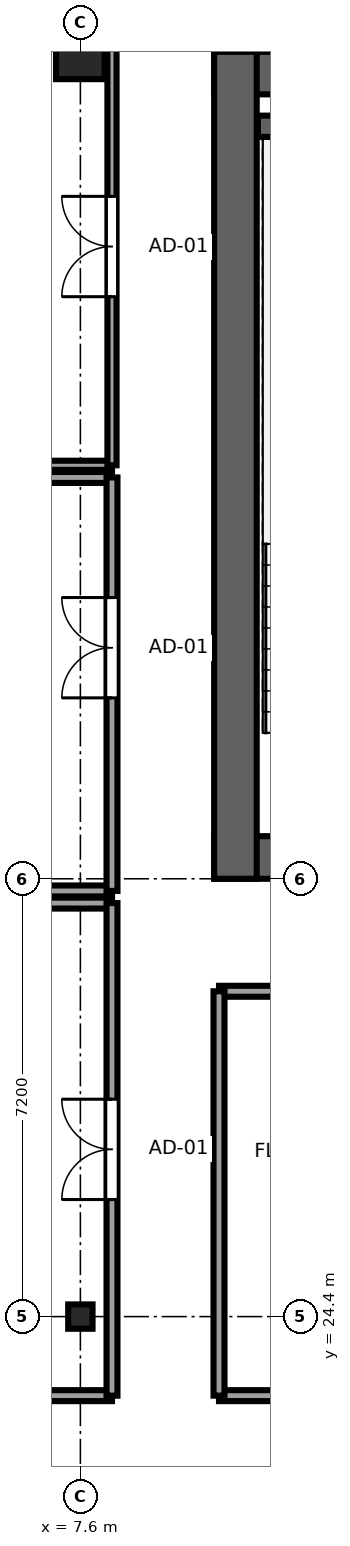
"""IFC4 building model, lengths in metres.
Left out: names, types, materials, properties, quantities, classifications, styles, units other than length and angle.
Written with IfcOpenShell. Run it as: python <this file> out.ifc"""

import sys

from ifc_helpers import new_model, si_unit, direction, frame, frame_2d, origin, origin_2d, place, context, subcontext, project, spatial, rectangle, i_section, extrude, source, transform, mapped, element, fill, save


model = new_model("IFC4")
c1 = context("Model", 3, precision=1e-05, world=origin(), true_north=direction((0.0, 1.0)))
c2 = subcontext(c1, "Body", "Model", "MODEL_VIEW")
j1 = project(units=[si_unit("LENGTHUNIT", "METRE"), si_unit("PLANEANGLEUNIT", "RADIAN")], contexts=[c1])
p1 = place(None, origin())
s1 = spatial("IfcSite", under=j1, at=p1, CompositionType="ELEMENT")
p2 = place(p1, origin())
s2 = spatial("IfcBuilding", under=s1, at=p2, CompositionType="ELEMENT")
p3 = place(p2, frame((0.0, 0.0, 168.35)))
s3 = spatial("IfcBuildingStorey", under=s2, at=p3, CompositionType="ELEMENT", Elevation=168.35)
p4 = place(p3, frame((9.8, 31.95, 0.0), z_axis=(0.0, 0.0, 1.0), x_axis=(1.0, 0.0, 0.0)))
e1 = element("IfcWall", 1, at=p4, inside=s3, PredefinedType="SHEAR", context=c2, shape_type="SweptSolid", body=[
    extrude(rectangle(XDim=26.4, YDim=0.7, at=frame_2d((13.2, 0.0))), origin(), (0.0, 0.0, 1.0), 3.55),
])
p5 = place(p4, frame((6.32, 0.0, 0.0), z_axis=(0.0, 0.0, 1.0), x_axis=(-1.0, 0.0, 0.0)))
e2 = element("IfcOpeningElement", 2, at=p5, cuts=e1, PredefinedType="OPENING", context=c2, shape_type="SweptSolid", body=[
    extrude(rectangle(XDim=1.5, YDim=2.04, at=frame_2d((0.75, 1.02))), frame((0.0, 0.36, 0.0), z_axis=(0.0, -1.0, 0.0), x_axis=(1.0, 0.0, 0.0)), (0.0, 0.0, 1.0), 0.72),
])
p6 = place(p4, frame((13.95, 0.0, 0.0), z_axis=(0.0, 0.0, 1.0), x_axis=(-1.0, 0.0, 0.0)))
e3 = element("IfcOpeningElement", 3, at=p6, cuts=e1, PredefinedType="OPENING", context=c2, shape_type="SweptSolid", body=[
    extrude(rectangle(XDim=1.5, YDim=2.04, at=frame_2d((0.75, 1.02))), frame((0.0, 0.36, 0.0), z_axis=(0.0, -1.0, 0.0), x_axis=(1.0, 0.0, 0.0)), (0.0, 0.0, 1.0), 0.72),
])
p7 = place(p4, frame((21.58, 0.0, 0.0), z_axis=(0.0, 0.0, 1.0), x_axis=(-1.0, 0.0, 0.0)))
e4 = element("IfcOpeningElement", 4, at=p7, cuts=e1, PredefinedType="OPENING", context=c2, shape_type="SweptSolid", body=[
    extrude(rectangle(XDim=1.5, YDim=2.04, at=frame_2d((0.75, 1.02))), frame((0.0, 0.36, 0.0), z_axis=(0.0, -1.0, 0.0), x_axis=(1.0, 0.0, 0.0)), (0.0, 0.0, 1.0), 0.72),
])
p8 = place(p4, frame((8.37, 0.0, 0.0), z_axis=(0.0, 0.0, 1.0), x_axis=(-1.0, 0.0, 0.0)))
e5 = element("IfcOpeningElement", 5, at=p8, cuts=e1, PredefinedType="OPENING", context=c2, shape_type="SweptSolid", body=[
    extrude(rectangle(XDim=0.82, YDim=2.01, at=frame_2d((0.41, 1.005))), frame((0.0, 0.36, 0.0), z_axis=(0.0, -1.0, 0.0), x_axis=(1.0, 0.0, 0.0)), (0.0, 0.0, 1.0), 0.72),
])
p9 = place(p4, frame((18.87, 0.0, 0.0), z_axis=(0.0, 0.0, 1.0), x_axis=(-1.0, 0.0, 0.0)))
e6 = element("IfcOpeningElement", 6, at=p9, cuts=e1, PredefinedType="OPENING", context=c2, shape_type="SweptSolid", body=[
    extrude(rectangle(XDim=0.82, YDim=2.01, at=frame_2d((0.41, 1.005))), frame((0.0, 0.36, 0.0), z_axis=(0.0, -1.0, 0.0), x_axis=(1.0, 0.0, 0.0)), (0.0, 0.0, 1.0), 0.72),
])
p10 = place(p3, frame((9.8, 44.85, 0.0), z_axis=(0.0, 0.0, 1.0), x_axis=(1.0, 0.0, 0.0)))
e7 = element("IfcWall", 7, at=p10, inside=s3, PredefinedType="SHEAR", context=c2, shape_type="SweptSolid", body=[
    extrude(rectangle(XDim=26.4, YDim=0.7, at=frame_2d((13.2, 0.0))), origin(), (0.0, 0.0, 1.0), 3.55),
])
p11 = place(p3, frame((10.15, 31.6, 0.0), z_axis=(0.0, 0.0, 1.0), x_axis=(0.0, 1.0, 0.0)))
e8 = element("IfcWall", 8, at=p11, inside=s3, PredefinedType="SHEAR", context=c2, shape_type="SweptSolid", body=[
    extrude(rectangle(XDim=13.6, YDim=0.7, at=frame_2d((6.8, 0.0))), origin(), (0.0, 0.0, 1.0), 3.55),
])
p12 = place(p3, frame((10.52, 43.975, 0.0), z_axis=(0.0, 0.0, 1.0), x_axis=(1.0, 0.0, 0.0)))
e9 = element("IfcWall", 9, at=p12, inside=s3, PredefinedType="SHEAR", context=c2, shape_type="SweptSolid", body=[
    extrude(rectangle(XDim=3.6, YDim=0.35, at=frame_2d((1.8, 0.0))), origin(), (0.0, 0.0, 1.0), 3.55),
])
m1 = source(origin(), c2, "Body", "SweptSolid", [
    extrude(i_section(OverallWidth=0.4, OverallDepth=0.4, WebThickness=0.02, FlangeThickness=0.035, at=origin_2d()), origin(), (0.0, 0.0, 1.0), 3.55),
])
p13 = place(p3, frame((7.6, 24.4, 0.0), z_axis=(0.0, 0.0, 1.0), x_axis=(1.0, 0.0, 0.0)))
e10 = element("IfcColumn", 10, at=p13, inside=s3, PredefinedType="COLUMN", context=c2, shape_type="MappedRepresentation", body=[
    mapped(m1, transform((0.0, 0.0, 0.0), x_axis=(1.0, 0.0, 0.0), y_axis=(0.0, 1.0, 0.0), z_axis=(0.0, 0.0, 1.0), scale=1.0)),
])
m2 = source(origin(), c2, "Body", "SweptSolid", [
    extrude(rectangle(XDim=0.8, YDim=0.8, at=origin_2d()), origin(), (0.0, 0.0, 1.0), 3.55),
])
p14 = place(p3, frame((7.6, 45.15, 0.0), z_axis=(0.0, 0.0, 1.0), x_axis=(1.0, 0.0, 0.0)))
e11 = element("IfcColumn", 11, at=p14, inside=s3, PredefinedType="COLUMN", context=c2, shape_type="MappedRepresentation", body=[
    mapped(m2, transform((0.0, 0.0, 0.0), x_axis=(1.0, 0.0, 0.0), y_axis=(0.0, 1.0, 0.0), z_axis=(0.0, 0.0, 1.0), scale=1.0)),
])
for number, where, z_axis, x_axis in (
    (12, (3.005, 23.1, 0.0), (0.0, 0.0, 1.0), (1.0, 0.0, 0.0)),
    (13, (3.005, 31.2, 0.0), (0.0, 0.0, 1.0), (1.0, 0.0, 0.0)),
):
    element("IfcWall", number, at=place(p3, frame(where, z_axis=z_axis, x_axis=x_axis)), inside=s3, PredefinedType="PARTITIONING", context=c2, shape_type="SweptSolid", body=[
        extrude(rectangle(XDim=5.115, YDim=0.18, at=frame_2d((2.558, 0.0))), origin(), (0.0, 0.0, 1.0), 3.37),
    ])
p15 = place(p3, frame((8.12, 23.1, 0.0), z_axis=(0.0, 0.0, 1.0), x_axis=(0.0, 1.0, 0.0)))
e14 = element("IfcWall", 14, at=p15, inside=s3, PredefinedType="PARTITIONING", context=c2, shape_type="SweptSolid", body=[
    extrude(rectangle(XDim=8.1, YDim=0.18, at=frame_2d((4.05, 0.0))), origin(), (0.0, 0.0, 1.0), 3.37),
])
p16 = place(p15, frame((3.225, 0.0, 0.0)))
e15 = element("IfcOpeningElement", 15, at=p16, cuts=e14, PredefinedType="OPENING", context=c2, shape_type="SweptSolid", body=[
    extrude(rectangle(XDim=1.65, YDim=2.15, at=frame_2d((0.825, 1.075))), frame((0.0, 0.1, 0.0), z_axis=(0.0, -1.0, 0.0), x_axis=(1.0, 0.0, 0.0)), (0.0, 0.0, 1.0), 0.2),
])
for number, where, z_axis, x_axis in (
    (16, (3.005, 31.4, 0.0), (0.0, 0.0, 1.0), (1.0, 0.0, 0.0)),
    (17, (3.005, 38.2, 0.0), (0.0, 0.0, 1.0), (1.0, 0.0, 0.0)),
):
    element("IfcWall", number, at=place(p3, frame(where, z_axis=z_axis, x_axis=x_axis)), inside=s3, PredefinedType="PARTITIONING", context=c2, shape_type="SweptSolid", body=[
        extrude(rectangle(XDim=5.115, YDim=0.18, at=frame_2d((2.558, 0.0))), origin(), (0.0, 0.0, 1.0), 3.37),
    ])
p17 = place(p3, frame((8.12, 31.4, 0.0), z_axis=(0.0, 0.0, 1.0), x_axis=(0.0, 1.0, 0.0)))
e18 = element("IfcWall", 18, at=p17, inside=s3, PredefinedType="PARTITIONING", context=c2, shape_type="SweptSolid", body=[
    extrude(rectangle(XDim=6.8, YDim=0.18, at=frame_2d((3.4, 0.0))), origin(), (0.0, 0.0, 1.0), 3.37),
])
p18 = place(p17, frame((3.175, 0.0, 0.0)))
e19 = element("IfcOpeningElement", 19, at=p18, cuts=e18, PredefinedType="OPENING", context=c2, shape_type="SweptSolid", body=[
    extrude(rectangle(XDim=1.65, YDim=2.15, at=frame_2d((0.825, 1.075))), frame((0.0, 0.1, 0.0), z_axis=(0.0, -1.0, 0.0), x_axis=(1.0, 0.0, 0.0)), (0.0, 0.0, 1.0), 0.2),
])
p19 = place(p3, frame((3.005, 38.4, 0.0), z_axis=(0.0, 0.0, 1.0), x_axis=(1.0, 0.0, 0.0)))
e20 = element("IfcWall", 20, at=p19, inside=s3, PredefinedType="PARTITIONING", context=c2, shape_type="SweptSolid", body=[
    extrude(rectangle(XDim=5.115, YDim=0.15, at=frame_2d((2.558, 0.0))), origin(), (0.0, 0.0, 1.0), 3.37),
])
p20 = place(p3, frame((8.12, 38.4, 0.0), z_axis=(0.0, 0.0, 1.0), x_axis=(0.0, 1.0, 0.0)))
e21 = element("IfcWall", 21, at=p20, inside=s3, PredefinedType="PARTITIONING", context=c2, shape_type="SweptSolid", body=[
    extrude(rectangle(XDim=7.195, YDim=0.15, at=frame_2d((3.598, 0.0))), origin(), (0.0, 0.0, 1.0), 3.37),
])
p21 = place(p20, frame((2.772, 0.0, 0.0)))
e22 = element("IfcOpeningElement", 22, at=p21, cuts=e21, PredefinedType="OPENING", context=c2, shape_type="SweptSolid", body=[
    extrude(rectangle(XDim=1.65, YDim=2.15, at=frame_2d((0.825, 1.075))), frame((0.0, 0.085, 0.0), z_axis=(0.0, -1.0, 0.0), x_axis=(1.0, 0.0, 0.0)), (0.0, 0.0, 1.0), 0.17),
])
p22 = place(p3, frame((9.88, 23.1, 0.0), z_axis=(0.0, 0.0, 1.0), x_axis=(1.0, 0.0, 0.0)))
e23 = element("IfcWall", 23, at=p22, inside=s3, PredefinedType="PARTITIONING", context=c2, shape_type="SweptSolid", body=[
    extrude(rectangle(XDim=4.22, YDim=0.18, at=frame_2d((2.11, 0.0))), origin(), (0.0, 0.0, 1.0), 3.37),
])
p23 = place(p22, frame((1.285, 0.0, 0.0)))
e24 = element("IfcOpeningElement", 24, at=p23, cuts=e23, PredefinedType="OPENING", context=c2, shape_type="SweptSolid", body=[
    extrude(rectangle(XDim=1.65, YDim=2.15, at=frame_2d((0.825, 1.075))), frame((0.0, 0.1, 0.0), z_axis=(0.0, -1.0, 0.0), x_axis=(1.0, 0.0, 0.0)), (0.0, 0.0, 1.0), 0.2),
])
p24 = place(p3, frame((9.88, 29.75, 0.0), z_axis=(0.0, 0.0, 1.0), x_axis=(1.0, 0.0, 0.0)))
e25 = element("IfcWall", 25, at=p24, inside=s3, PredefinedType="PARTITIONING", context=c2, shape_type="SweptSolid", body=[
    extrude(rectangle(XDim=4.22, YDim=0.18, at=frame_2d((2.11, 0.0))), origin(), (0.0, 0.0, 1.0), 3.37),
])
p25 = place(p3, frame((9.88, 23.1, 0.0), z_axis=(0.0, 0.0, 1.0), x_axis=(0.0, 1.0, 0.0)))
e26 = element("IfcWall", 26, at=p25, inside=s3, PredefinedType="PARTITIONING", context=c2, shape_type="SweptSolid", body=[
    extrude(rectangle(XDim=6.65, YDim=0.18, at=frame_2d((3.325, 0.0))), origin(), (0.0, 0.0, 1.0), 3.37),
])
m3 = source(origin(), c2, "Body", "SweptSolid", [
    extrude(rectangle(XDim=1.65, YDim=2.15, at=frame_2d((0.825, 1.075))), frame((0.0, 0.025, 0.0), z_axis=(0.0, -1.0, 0.0), x_axis=(1.0, 0.0, 0.0)), (0.0, 0.0, 1.0), 0.05),
])
p26 = place(p16, origin())
e27 = element("IfcDoor", 27, at=p26, inside=s3, OperationType="DOUBLE_DOOR_SINGLE_SWING", PredefinedType="DOOR", context=c2, shape_type="MappedRepresentation", body=[
    mapped(m3, transform((0.0, 0.0, 0.0), x_axis=(1.0, 0.0, 0.0), y_axis=(0.0, 1.0, 0.0), z_axis=(0.0, 0.0, 1.0), scale=1.0)),
])
fill(e15, e27)
p27 = place(p18, origin())
e28 = element("IfcDoor", 28, at=p27, inside=s3, OperationType="DOUBLE_DOOR_SINGLE_SWING", PredefinedType="DOOR", context=c2, shape_type="MappedRepresentation", body=[
    mapped(m3, transform((0.0, 0.0, 0.0), x_axis=(1.0, 0.0, 0.0), y_axis=(0.0, 1.0, 0.0), z_axis=(0.0, 0.0, 1.0), scale=1.0)),
])
fill(e19, e28)
p28 = place(p21, origin())
e29 = element("IfcDoor", 29, at=p28, inside=s3, OperationType="DOUBLE_DOOR_SINGLE_SWING", PredefinedType="DOOR", context=c2, shape_type="MappedRepresentation", body=[
    mapped(m3, transform((0.0, 0.0, 0.0), x_axis=(1.0, 0.0, 0.0), y_axis=(0.0, 1.0, 0.0), z_axis=(0.0, 0.0, 1.0), scale=1.0)),
])
fill(e22, e29)
save(model, sys.argv[1])
